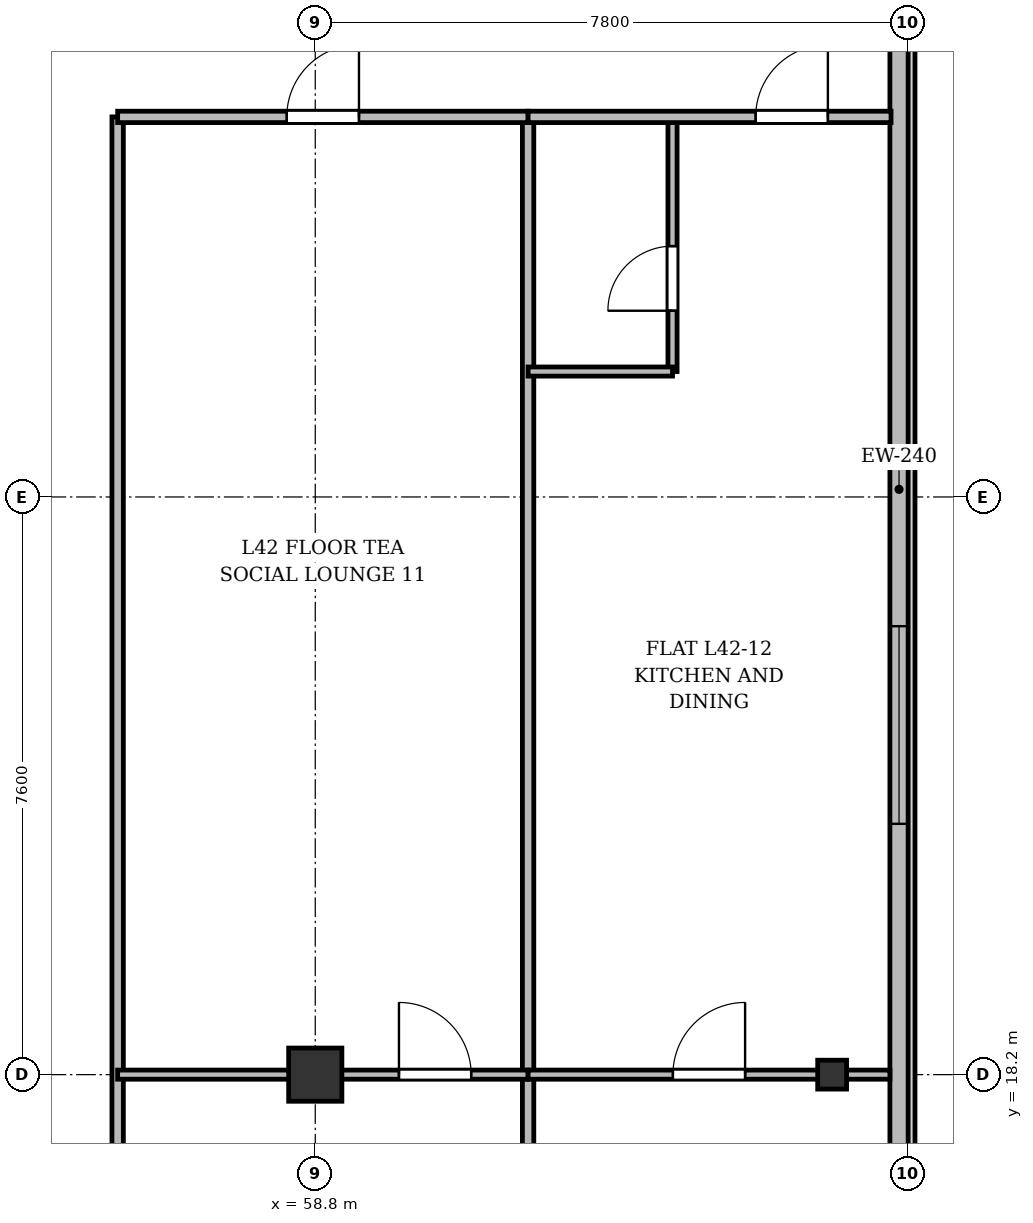
"""IFC4 building model, lengths in metres.
Left out: names, types, materials, properties, quantities, classifications, styles, units other than length and angle.
Written with IfcOpenShell. Run it as: python <this file> out.ifc"""

import sys

from ifc_helpers import new_model, si_unit, direction, frame, frame_2d, origin, origin_2d, place, context, subcontext, project, spatial, rectangle, i_section, extrude, source, transform, mapped, element, fill, save


model = new_model("IFC4")
c1 = context("Model", 3, precision=1e-05, world=origin(), true_north=direction((0.0, 1.0)))
c2 = subcontext(c1, "Body", "Model", "MODEL_VIEW")
j1 = project(units=[si_unit("LENGTHUNIT", "METRE"), si_unit("PLANEANGLEUNIT", "RADIAN")], contexts=[c1])
p1 = place(None, origin())
s1 = spatial("IfcSite", under=j1, at=p1, CompositionType="ELEMENT")
p2 = place(p1, origin())
s2 = spatial("IfcBuilding", under=s1, at=p2, CompositionType="ELEMENT")
p3 = place(p2, frame((0.0, 0.0, 160.9)))
s3 = spatial("IfcBuildingStorey", under=s2, at=p3, CompositionType="ELEMENT", Elevation=160.9)
m1 = source(origin(), c2, "Body", "SweptSolid", [
    extrude(rectangle(XDim=0.7, YDim=0.7, at=origin_2d()), origin(), (0.0, 0.0, 1.0), 3.6),
])
p4 = place(p3, frame((58.8, 18.2, 0.0), z_axis=(0.0, 0.0, 1.0), x_axis=(1.0, 0.0, 0.0)))
e1 = element("IfcColumn", 1, at=p4, inside=s3, PredefinedType="COLUMN", context=c2, shape_type="MappedRepresentation", body=[
    mapped(m1, transform((0.0, 0.0, 0.0), x_axis=(1.0, 0.0, 0.0), y_axis=(0.0, 1.0, 0.0), z_axis=(0.0, 0.0, 1.0), scale=1.0)),
])
m2 = source(origin(), c2, "Body", "SweptSolid", [
    extrude(i_section(OverallWidth=0.38, OverallDepth=0.38, WebThickness=0.02, FlangeThickness=0.03, at=origin_2d()), origin(), (0.0, 0.0, 1.0), 3.6),
])
p5 = place(p3, frame((65.6, 18.2, 0.0), z_axis=(0.0, 0.0, 1.0), x_axis=(1.0, 0.0, 0.0)))
e2 = element("IfcColumn", 2, at=p5, inside=s3, PredefinedType="COLUMN", context=c2, shape_type="MappedRepresentation", body=[
    mapped(m2, transform((0.0, 0.0, 0.0), x_axis=(1.0, 0.0, 0.0), y_axis=(0.0, 1.0, 0.0), z_axis=(0.0, 0.0, 1.0), scale=1.0)),
])
p6 = place(p3, frame((66.48, 45.5, 0.0), z_axis=(0.0, 0.0, 1.0), x_axis=(0.0, -1.0, 0.0)))
e3 = element("IfcWall", 3, at=p6, inside=s3, PredefinedType="SOLIDWALL", context=c2, shape_type="SweptSolid", body=[
    extrude(rectangle(XDim=39.2, YDim=0.24, at=frame_2d((19.6, 0.0))), origin(), (0.0, 0.0, 1.0), 3.35),
])
p7 = place(p6, frame((36.55, 0.0, 0.92)))
e4 = element("IfcOpeningElement", 4, at=p7, cuts=e3, PredefinedType="OPENING", context=c2, shape_type="SweptSolid", body=[
    extrude(rectangle(XDim=1.2, YDim=1.65, at=frame_2d((0.6, 0.825))), frame((0.0, 0.13, 0.0), z_axis=(0.0, -1.0, 0.0), x_axis=(1.0, 0.0, 0.0)), (0.0, 0.0, 1.0), 0.26),
])
p8 = place(p6, frame((32.8, 0.0, 0.92)))
e5 = element("IfcOpeningElement", 5, at=p8, cuts=e3, PredefinedType="OPENING", context=c2, shape_type="SweptSolid", body=[
    extrude(rectangle(XDim=2.6, YDim=1.9, at=frame_2d((1.3, 0.95))), frame((0.0, 0.13, 0.0), z_axis=(0.0, -1.0, 0.0), x_axis=(1.0, 0.0, 0.0)), (0.0, 0.0, 1.0), 0.26),
])
p9 = place(p6, frame((28.6, 0.0, 0.92)))
e6 = element("IfcOpeningElement", 6, at=p9, cuts=e3, PredefinedType="OPENING", context=c2, shape_type="SweptSolid", body=[
    extrude(rectangle(XDim=2.6, YDim=1.9, at=frame_2d((1.3, 0.95))), frame((0.0, 0.13, 0.0), z_axis=(0.0, -1.0, 0.0), x_axis=(1.0, 0.0, 0.0)), (0.0, 0.0, 1.0), 0.26),
])
p10 = place(p6, frame((21.4, 0.0, 0.92)))
e7 = element("IfcOpeningElement", 7, at=p10, cuts=e3, PredefinedType="OPENING", context=c2, shape_type="SweptSolid", body=[
    extrude(rectangle(XDim=2.6, YDim=1.9, at=frame_2d((1.3, 0.95))), frame((0.0, 0.13, 0.0), z_axis=(0.0, -1.0, 0.0), x_axis=(1.0, 0.0, 0.0)), (0.0, 0.0, 1.0), 0.26),
])
p11 = place(p6, frame((7.4, 0.0, 0.92)))
e8 = element("IfcOpeningElement", 8, at=p11, cuts=e3, PredefinedType="OPENING", context=c2, shape_type="SweptSolid", body=[
    extrude(rectangle(XDim=2.6, YDim=1.9, at=frame_2d((1.3, 0.95))), frame((0.0, 0.13, 0.0), z_axis=(0.0, -1.0, 0.0), x_axis=(1.0, 0.0, 0.0)), (0.0, 0.0, 1.0), 0.26),
])
p12 = place(p6, frame((4.5, 0.0, 0.92)))
e9 = element("IfcOpeningElement", 9, at=p12, cuts=e3, PredefinedType="OPENING", context=c2, shape_type="SweptSolid", body=[
    extrude(rectangle(XDim=1.2, YDim=1.65, at=frame_2d((0.6, 0.825))), frame((0.0, 0.13, 0.0), z_axis=(0.0, -1.0, 0.0), x_axis=(1.0, 0.0, 0.0)), (0.0, 0.0, 1.0), 0.26),
])
p13 = place(p6, frame((1.15, 0.0, 0.92)))
e10 = element("IfcOpeningElement", 10, at=p13, cuts=e3, PredefinedType="OPENING", context=c2, shape_type="SweptSolid", body=[
    extrude(rectangle(XDim=1.2, YDim=1.65, at=frame_2d((0.6, 0.825))), frame((0.0, 0.13, 0.0), z_axis=(0.0, -1.0, 0.0), x_axis=(1.0, 0.0, 0.0)), (0.0, 0.0, 1.0), 0.26),
])
for number, where, z_axis, x_axis in (
    (11, (61.6, 3.525, 0.0), (0.0, 0.0, 1.0), (0.0, 1.0, 0.0)),
    (12, (56.2, 3.525, 0.0), (0.0, 0.0, 1.0), (0.0, 1.0, 0.0)),
):
    element("IfcWall", number, at=place(p3, frame(where, z_axis=z_axis, x_axis=x_axis)), inside=s3, PredefinedType="PARTITIONING", context=c2, shape_type="SweptSolid", body=[
        extrude(rectangle(XDim=27.275, YDim=0.15, at=frame_2d((13.638, 0.0))), origin(), (0.0, 0.0, 1.0), 2.75),
    ])
p14 = place(p3, frame((56.2, 30.8, 0.0), z_axis=(0.0, 0.0, 1.0), x_axis=(1.0, 0.0, 0.0)))
e13 = element("IfcWall", 13, at=p14, inside=s3, PredefinedType="PARTITIONING", context=c2, shape_type="SweptSolid", body=[
    extrude(rectangle(XDim=5.4, YDim=0.15, at=frame_2d((2.7, 0.0))), origin(), (0.0, 0.0, 1.0), 2.85),
])
p15 = place(p14, frame((2.225, 0.0, 0.0)))
e14 = element("IfcOpeningElement", 14, at=p15, cuts=e13, PredefinedType="OPENING", context=c2, shape_type="SweptSolid", body=[
    extrude(rectangle(XDim=0.95, YDim=2.15, at=frame_2d((0.475, 1.075))), frame((0.0, 0.085, 0.0), z_axis=(0.0, -1.0, 0.0), x_axis=(1.0, 0.0, 0.0)), (0.0, 0.0, 1.0), 0.17),
])
p16 = place(p3, frame((56.2, 18.2, 0.0), z_axis=(0.0, 0.0, 1.0), x_axis=(1.0, 0.0, 0.0)))
e15 = element("IfcWall", 15, at=p16, inside=s3, PredefinedType="PARTITIONING", context=c2, shape_type="SweptSolid", body=[
    extrude(rectangle(XDim=5.4, YDim=0.12, at=frame_2d((2.7, 0.0))), origin(), (0.0, 0.0, 1.0), 2.75),
])
p17 = place(p16, frame((3.701, 0.0, 0.0)))
e16 = element("IfcOpeningElement", 16, at=p17, cuts=e15, PredefinedType="OPENING", context=c2, shape_type="SweptSolid", body=[
    extrude(rectangle(XDim=0.95, YDim=2.15, at=frame_2d((0.475, 1.075))), frame((0.0, 0.07, 0.0), z_axis=(0.0, -1.0, 0.0), x_axis=(1.0, 0.0, 0.0)), (0.0, 0.0, 1.0), 0.14),
])
p18 = place(p3, frame((61.6, 18.2, 0.0), z_axis=(0.0, 0.0, 1.0), x_axis=(1.0, 0.0, 0.0)))
e17 = element("IfcWall", 17, at=p18, inside=s3, PredefinedType="PARTITIONING", context=c2, shape_type="SweptSolid", body=[
    extrude(rectangle(XDim=4.76, YDim=0.12, at=frame_2d((2.38, 0.0))), origin(), (0.0, 0.0, 1.0), 2.75),
])
p19 = place(p18, frame((1.905, 0.0, 0.0)))
e18 = element("IfcOpeningElement", 18, at=p19, cuts=e17, PredefinedType="OPENING", context=c2, shape_type="SweptSolid", body=[
    extrude(rectangle(XDim=0.95, YDim=2.15, at=frame_2d((0.475, 1.075))), frame((0.0, 0.07, 0.0), z_axis=(0.0, -1.0, 0.0), x_axis=(1.0, 0.0, 0.0)), (0.0, 0.0, 1.0), 0.14),
])
p20 = place(p3, frame((63.5, 27.45, 0.0), z_axis=(0.0, 0.0, 1.0), x_axis=(0.0, 1.0, 0.0)))
e19 = element("IfcWall", 19, at=p20, inside=s3, PredefinedType="PARTITIONING", context=c2, shape_type="SweptSolid", body=[
    extrude(rectangle(XDim=3.35, YDim=0.12, at=frame_2d((1.675, 0.0))), origin(), (0.0, 0.0, 1.0), 3.35),
])
p21 = place(p20, frame((0.8, 0.0, 0.0)))
e20 = element("IfcOpeningElement", 20, at=p21, cuts=e19, PredefinedType="OPENING", context=c2, shape_type="SweptSolid", body=[
    extrude(rectangle(XDim=0.85, YDim=2.1, at=frame_2d((0.425, 1.05))), frame((0.0, 0.07, 0.0), z_axis=(0.0, -1.0, 0.0), x_axis=(1.0, 0.0, 0.0)), (0.0, 0.0, 1.0), 0.14),
])
p22 = place(p3, frame((61.6, 27.45, 0.0), z_axis=(0.0, 0.0, 1.0), x_axis=(1.0, 0.0, 0.0)))
e21 = element("IfcWall", 21, at=p22, inside=s3, PredefinedType="PARTITIONING", context=c2, shape_type="SweptSolid", body=[
    extrude(rectangle(XDim=1.9, YDim=0.12, at=frame_2d((0.95, 0.0))), origin(), (0.0, 0.0, 1.0), 3.35),
])
p23 = place(p3, frame((61.6, 30.8, 0.0), z_axis=(0.0, 0.0, 1.0), x_axis=(1.0, 0.0, 0.0)))
e22 = element("IfcWall", 22, at=p23, inside=s3, PredefinedType="PARTITIONING", context=c2, shape_type="SweptSolid", body=[
    extrude(rectangle(XDim=4.775, YDim=0.15, at=frame_2d((2.387, 0.0))), origin(), (0.0, 0.0, 1.0), 2.85),
])
p24 = place(p23, frame((2.994, 0.0, 0.0)))
e23 = element("IfcOpeningElement", 23, at=p24, cuts=e22, PredefinedType="OPENING", context=c2, shape_type="SweptSolid", body=[
    extrude(rectangle(XDim=0.95, YDim=2.15, at=frame_2d((0.475, 1.075))), frame((0.0, 0.085, 0.0), z_axis=(0.0, -1.0, 0.0), x_axis=(1.0, 0.0, 0.0)), (0.0, 0.0, 1.0), 0.17),
])
m3 = source(origin(), c2, "Body", "SweptSolid", [
    extrude(rectangle(XDim=2.6, YDim=1.9, at=frame_2d((1.3, 0.95))), frame((0.0, 0.03, 0.0), z_axis=(0.0, -1.0, 0.0), x_axis=(1.0, 0.0, 0.0)), (0.0, 0.0, 1.0), 0.06),
])
p25 = place(p10, origin())
e24 = element("IfcWindow", 24, at=p25, inside=s3, PartitioningType="SINGLE_PANEL", PredefinedType="WINDOW", context=c2, shape_type="MappedRepresentation", body=[
    mapped(m3, transform((0.0, 0.0, 0.0), x_axis=(1.0, 0.0, 0.0), y_axis=(0.0, 1.0, 0.0), z_axis=(0.0, 0.0, 1.0), scale=1.0)),
])
fill(e7, e24)
m4 = source(origin(), c2, "Body", "SweptSolid", [
    extrude(rectangle(XDim=0.95, YDim=2.15, at=frame_2d((0.475, 1.075))), frame((0.0, 0.025, 0.0), z_axis=(0.0, -1.0, 0.0), x_axis=(1.0, 0.0, 0.0)), (0.0, 0.0, 1.0), 0.05),
])
p26 = place(p15, origin())
e25 = element("IfcDoor", 25, at=p26, inside=s3, OperationType="SINGLE_SWING_RIGHT", PredefinedType="DOOR", context=c2, shape_type="MappedRepresentation", body=[
    mapped(m4, transform((0.0, 0.0, 0.0), x_axis=(1.0, 0.0, 0.0), y_axis=(0.0, 1.0, 0.0), z_axis=(0.0, 0.0, 1.0), scale=1.0)),
])
fill(e14, e25)
p27 = place(p17, origin())
e26 = element("IfcDoor", 26, at=p27, inside=s3, OperationType="SINGLE_SWING_LEFT", PredefinedType="DOOR", context=c2, shape_type="MappedRepresentation", body=[
    mapped(m4, transform((0.0, 0.0, 0.0), x_axis=(1.0, 0.0, 0.0), y_axis=(0.0, 1.0, 0.0), z_axis=(0.0, 0.0, 1.0), scale=1.0)),
])
fill(e16, e26)
p28 = place(p19, origin())
e27 = element("IfcDoor", 27, at=p28, inside=s3, OperationType="SINGLE_SWING_RIGHT", PredefinedType="DOOR", context=c2, shape_type="MappedRepresentation", body=[
    mapped(m4, transform((0.0, 0.0, 0.0), x_axis=(1.0, 0.0, 0.0), y_axis=(0.0, 1.0, 0.0), z_axis=(0.0, 0.0, 1.0), scale=1.0)),
])
fill(e18, e27)
m5 = source(origin(), c2, "Body", "SweptSolid", [
    extrude(rectangle(XDim=0.85, YDim=2.1, at=frame_2d((0.425, 1.05))), frame((0.0, 0.025, 0.0), z_axis=(0.0, -1.0, 0.0), x_axis=(1.0, 0.0, 0.0)), (0.0, 0.0, 1.0), 0.05),
])
p29 = place(p21, origin())
e28 = element("IfcDoor", 28, at=p29, inside=s3, OperationType="SINGLE_SWING_LEFT", PredefinedType="DOOR", context=c2, shape_type="MappedRepresentation", body=[
    mapped(m5, transform((0.0, 0.0, 0.0), x_axis=(1.0, 0.0, 0.0), y_axis=(0.0, 1.0, 0.0), z_axis=(0.0, 0.0, 1.0), scale=1.0)),
])
fill(e20, e28)
p30 = place(p24, origin())
e29 = element("IfcDoor", 29, at=p30, inside=s3, OperationType="SINGLE_SWING_RIGHT", PredefinedType="DOOR", context=c2, shape_type="MappedRepresentation", body=[
    mapped(m4, transform((0.0, 0.0, 0.0), x_axis=(1.0, 0.0, 0.0), y_axis=(0.0, 1.0, 0.0), z_axis=(0.0, 0.0, 1.0), scale=1.0)),
])
fill(e23, e29)
save(model, sys.argv[1])
